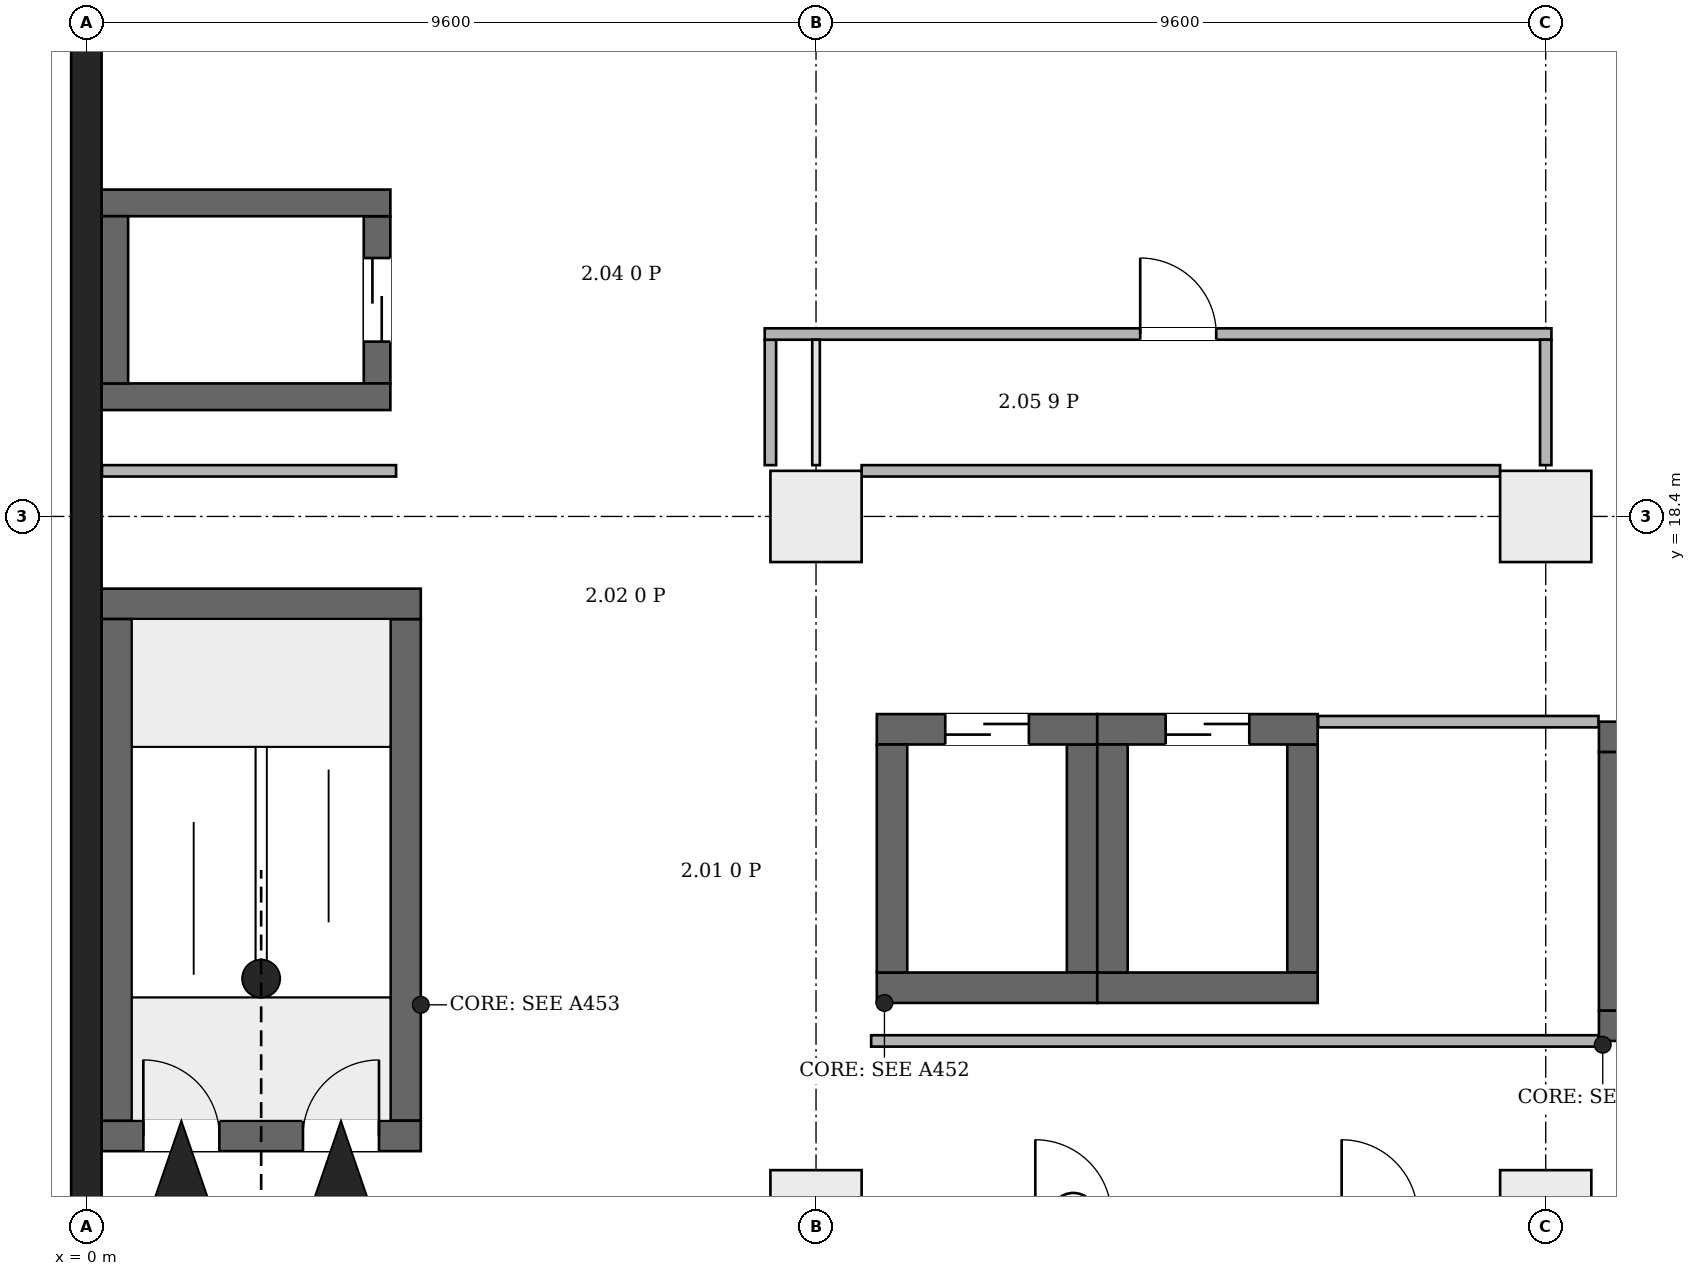
"""IFC4 building model, lengths in metres.
Left out: names, types, materials, properties, quantities, classifications, styles, units other than length and angle.
Written with IfcOpenShell. Run it as: python <this file> out.ifc"""

import sys

from ifc_helpers import new_model, si_unit, direction, frame, frame_2d, origin, origin_2d, place, context, subcontext, project, spatial, rectangle, extrude, element, fill, save


model = new_model("IFC4")
c1 = context("Model", 3, precision=1e-05, world=origin(), true_north=direction((0.0, 1.0)))
c2 = subcontext(c1, "Body", "Model", "MODEL_VIEW")
j1 = project(units=[si_unit("LENGTHUNIT", "METRE"), si_unit("PLANEANGLEUNIT", "RADIAN")], contexts=[c1])
p1 = place(None, origin())
s1 = spatial("IfcSite", under=j1, at=p1, CompositionType="ELEMENT")
p2 = place(p1, origin())
s2 = spatial("IfcBuilding", under=s1, at=p2, CompositionType="ELEMENT")
p3 = place(p2, frame((0.0, 0.0, 14.2)))
s3 = spatial("IfcBuildingStorey", under=s2, at=p3, CompositionType="ELEMENT", Elevation=14.2)
p4 = place(p3, frame((0.0, -0.2, 0.0), z_axis=(0.0, 0.0, 1.0), x_axis=(0.0, 1.0, 0.0)))
e1 = element("IfcWall", 1, at=p4, inside=s3, PredefinedType="SHEAR", context=c2, shape_type="SweptSolid", body=[
    extrude(rectangle(XDim=46.88, YDim=0.4, at=frame_2d((23.44, 0.0))), origin(), (0.0, 0.0, 1.0), 7.5),
])
p5 = place(p3, frame((0.2, 10.25, 0.0), z_axis=(0.0, 0.0, 1.0), x_axis=(1.0, 0.0, 0.0)))
e2 = element("IfcWall", 2, at=p5, inside=s3, PredefinedType="SHEAR", context=c2, shape_type="SweptSolid", body=[
    extrude(rectangle(XDim=4.2, YDim=0.4, at=frame_2d((2.1, 0.0))), origin(), (0.0, 0.0, 1.0), 7.5),
])
p6 = place(p5, frame((0.55, 0.0, 0.0)))
e3 = element("IfcOpeningElement", 3, at=p6, cuts=e2, PredefinedType="OPENING", context=c2, shape_type="SweptSolid", body=[
    extrude(rectangle(XDim=1.0, YDim=2.1, at=frame_2d((0.5, 1.05))), frame((0.0, 0.21, 0.0), z_axis=(0.0, -1.0, 0.0), x_axis=(1.0, 0.0, 0.0)), (0.0, 0.0, 1.0), 0.42),
])
p7 = place(p5, frame((2.65, 0.0, 0.0)))
e4 = element("IfcOpeningElement", 4, at=p7, cuts=e2, PredefinedType="OPENING", context=c2, shape_type="SweptSolid", body=[
    extrude(rectangle(XDim=1.0, YDim=2.1, at=frame_2d((0.5, 1.05))), frame((0.0, 0.21, 0.0), z_axis=(0.0, -1.0, 0.0), x_axis=(1.0, 0.0, 0.0)), (0.0, 0.0, 1.0), 0.42),
])
p8 = place(p3, frame((0.2, 17.25, 0.0), z_axis=(0.0, 0.0, 1.0), x_axis=(1.0, 0.0, 0.0)))
e5 = element("IfcWall", 5, at=p8, inside=s3, PredefinedType="SHEAR", context=c2, shape_type="SweptSolid", body=[
    extrude(rectangle(XDim=4.2, YDim=0.4, at=frame_2d((2.1, 0.0))), origin(), (0.0, 0.0, 1.0), 7.5),
])
for number, where, z_axis, x_axis in (
    (6, (0.4, 10.45, 0.0), (0.0, 0.0, 1.0), (0.0, 1.0, 0.0)),
    (7, (4.2, 10.45, 0.0), (0.0, 0.0, 1.0), (0.0, 1.0, 0.0)),
):
    element("IfcWall", number, at=place(p3, frame(where, z_axis=z_axis, x_axis=x_axis)), inside=s3, PredefinedType="SHEAR", context=c2, shape_type="SweptSolid", body=[
        extrude(rectangle(XDim=6.6, YDim=0.4, at=frame_2d((3.3, 0.0))), origin(), (0.0, 0.0, 1.0), 7.5),
    ])
for number, where, z_axis, x_axis in (
    (8, (0.2, 19.975, 0.0), (0.0, 0.0, 1.0), (1.0, 0.0, 0.0)),
    (9, (0.2, 22.525, 0.0), (0.0, 0.0, 1.0), (1.0, 0.0, 0.0)),
):
    element("IfcWall", number, at=place(p3, frame(where, z_axis=z_axis, x_axis=x_axis)), inside=s3, PredefinedType="SHEAR", context=c2, shape_type="SweptSolid", body=[
        extrude(rectangle(XDim=3.8, YDim=0.35, at=frame_2d((1.9, 0.0))), origin(), (0.0, 0.0, 1.0), 7.5),
    ])
p9 = place(p3, frame((0.375, 20.15, 0.0), z_axis=(0.0, 0.0, 1.0), x_axis=(0.0, 1.0, 0.0)))
e10 = element("IfcWall", 10, at=p9, inside=s3, PredefinedType="SHEAR", context=c2, shape_type="SweptSolid", body=[
    extrude(rectangle(XDim=2.2, YDim=0.35, at=frame_2d((1.1, 0.0))), origin(), (0.0, 0.0, 1.0), 7.5),
])
p10 = place(p3, frame((3.825, 20.15, 0.0), z_axis=(0.0, 0.0, 1.0), x_axis=(0.0, 1.0, 0.0)))
e11 = element("IfcWall", 11, at=p10, inside=s3, PredefinedType="SHEAR", context=c2, shape_type="SweptSolid", body=[
    extrude(rectangle(XDim=2.2, YDim=0.35, at=frame_2d((1.1, 0.0))), origin(), (0.0, 0.0, 1.0), 7.5),
])
p11 = place(p10, frame((0.55, 0.0, 0.0)))
e12 = element("IfcOpeningElement", 12, at=p11, cuts=e11, PredefinedType="OPENING", context=c2, shape_type="SweptSolid", body=[
    extrude(rectangle(XDim=1.1, YDim=2.1, at=frame_2d((0.55, 1.05))), frame((0.0, 0.185, 0.0), z_axis=(0.0, -1.0, 0.0), x_axis=(1.0, 0.0, 0.0)), (0.0, 0.0, 1.0), 0.37),
])
p12 = place(p3, frame((10.4, 12.2, 0.0), z_axis=(0.0, 0.0, 1.0), x_axis=(1.0, 0.0, 0.0)))
e13 = element("IfcWall", 13, at=p12, inside=s3, PredefinedType="SHEAR", context=c2, shape_type="SweptSolid", body=[
    extrude(rectangle(XDim=2.9, YDim=0.4, at=frame_2d((1.45, 0.0))), origin(), (0.0, 0.0, 1.0), 7.5),
])
p13 = place(p3, frame((10.4, 15.6, 0.0), z_axis=(0.0, 0.0, 1.0), x_axis=(1.0, 0.0, 0.0)))
e14 = element("IfcWall", 14, at=p13, inside=s3, PredefinedType="SHEAR", context=c2, shape_type="SweptSolid", body=[
    extrude(rectangle(XDim=2.9, YDim=0.4, at=frame_2d((1.45, 0.0))), origin(), (0.0, 0.0, 1.0), 7.5),
])
p14 = place(p13, frame((0.9, 0.0, 0.0)))
e15 = element("IfcOpeningElement", 15, at=p14, cuts=e14, PredefinedType="OPENING", context=c2, shape_type="SweptSolid", body=[
    extrude(rectangle(XDim=1.1, YDim=2.1, at=frame_2d((0.55, 1.05))), frame((0.0, 0.21, 0.0), z_axis=(0.0, -1.0, 0.0), x_axis=(1.0, 0.0, 0.0)), (0.0, 0.0, 1.0), 0.42),
])
for number, where, z_axis, x_axis in (
    (16, (10.6, 12.4, 0.0), (0.0, 0.0, 1.0), (0.0, 1.0, 0.0)),
    (17, (13.1, 12.4, 0.0), (0.0, 0.0, 1.0), (0.0, 1.0, 0.0)),
):
    element("IfcWall", number, at=place(p3, frame(where, z_axis=z_axis, x_axis=x_axis)), inside=s3, PredefinedType="SHEAR", context=c2, shape_type="SweptSolid", body=[
        extrude(rectangle(XDim=3.0, YDim=0.4, at=frame_2d((1.5, 0.0))), origin(), (0.0, 0.0, 1.0), 7.5),
    ])
p15 = place(p3, frame((13.3, 12.2, 0.0), z_axis=(0.0, 0.0, 1.0), x_axis=(1.0, 0.0, 0.0)))
e18 = element("IfcWall", 18, at=p15, inside=s3, PredefinedType="SHEAR", context=c2, shape_type="SweptSolid", body=[
    extrude(rectangle(XDim=2.9, YDim=0.4, at=frame_2d((1.45, 0.0))), origin(), (0.0, 0.0, 1.0), 7.5),
])
p16 = place(p3, frame((13.3, 15.6, 0.0), z_axis=(0.0, 0.0, 1.0), x_axis=(1.0, 0.0, 0.0)))
e19 = element("IfcWall", 19, at=p16, inside=s3, PredefinedType="SHEAR", context=c2, shape_type="SweptSolid", body=[
    extrude(rectangle(XDim=2.9, YDim=0.4, at=frame_2d((1.45, 0.0))), origin(), (0.0, 0.0, 1.0), 7.5),
])
p17 = place(p16, frame((0.9, 0.0, 0.0)))
e20 = element("IfcOpeningElement", 20, at=p17, cuts=e19, PredefinedType="OPENING", context=c2, shape_type="SweptSolid", body=[
    extrude(rectangle(XDim=1.1, YDim=2.1, at=frame_2d((0.55, 1.05))), frame((0.0, 0.21, 0.0), z_axis=(0.0, -1.0, 0.0), x_axis=(1.0, 0.0, 0.0)), (0.0, 0.0, 1.0), 0.42),
])
for number, where, z_axis, x_axis in (
    (21, (13.5, 12.4, 0.0), (0.0, 0.0, 1.0), (0.0, 1.0, 0.0)),
    (22, (16.0, 12.4, 0.0), (0.0, 0.0, 1.0), (0.0, 1.0, 0.0)),
):
    element("IfcWall", number, at=place(p3, frame(where, z_axis=z_axis, x_axis=x_axis)), inside=s3, PredefinedType="SHEAR", context=c2, shape_type="SweptSolid", body=[
        extrude(rectangle(XDim=3.0, YDim=0.4, at=frame_2d((1.5, 0.0))), origin(), (0.0, 0.0, 1.0), 7.5),
    ])
p18 = place(p3, frame((19.9, 11.7, 0.0), z_axis=(0.0, 0.0, 1.0), x_axis=(1.0, 0.0, 0.0)))
e23 = element("IfcWall", 23, at=p18, inside=s3, PredefinedType="SHEAR", context=c2, shape_type="SweptSolid", body=[
    extrude(rectangle(XDim=3.1, YDim=0.4, at=frame_2d((1.55, 0.0))), origin(), (0.0, 0.0, 1.0), 7.5),
])
p19 = place(p3, frame((19.9, 15.5, 0.0), z_axis=(0.0, 0.0, 1.0), x_axis=(1.0, 0.0, 0.0)))
e24 = element("IfcWall", 24, at=p19, inside=s3, PredefinedType="SHEAR", context=c2, shape_type="SweptSolid", body=[
    extrude(rectangle(XDim=3.1, YDim=0.4, at=frame_2d((1.55, 0.0))), origin(), (0.0, 0.0, 1.0), 7.5),
])
p20 = place(p19, frame((0.95, 0.0, 0.0)))
e25 = element("IfcOpeningElement", 25, at=p20, cuts=e24, PredefinedType="OPENING", context=c2, shape_type="SweptSolid", body=[
    extrude(rectangle(XDim=1.2, YDim=2.1, at=frame_2d((0.6, 1.05))), frame((0.0, 0.21, 0.0), z_axis=(0.0, -1.0, 0.0), x_axis=(1.0, 0.0, 0.0)), (0.0, 0.0, 1.0), 0.42),
])
p21 = place(p3, frame((20.1, 11.9, 0.0), z_axis=(0.0, 0.0, 1.0), x_axis=(0.0, 1.0, 0.0)))
e26 = element("IfcWall", 26, at=p21, inside=s3, PredefinedType="SHEAR", context=c2, shape_type="SweptSolid", body=[
    extrude(rectangle(XDim=3.4, YDim=0.4, at=frame_2d((1.7, 0.0))), origin(), (0.0, 0.0, 1.0), 7.5),
])
for number, where, z_axis, x_axis in (
    (27, (9.6, 9.2, 0.0), (0.0, 0.0, 1.0), (1.0, 0.0, 0.0)),
    (28, (19.2, 9.2, 0.0), (0.0, 0.0, 1.0), (1.0, 0.0, 0.0)),
    (29, (9.6, 18.4, 0.0), (0.0, 0.0, 1.0), (1.0, 0.0, 0.0)),
    (30, (19.2, 18.4, 0.0), (0.0, 0.0, 1.0), (1.0, 0.0, 0.0)),
):
    element("IfcColumn", number, at=place(p3, frame(where, z_axis=z_axis, x_axis=x_axis)), inside=s3, PredefinedType="COLUMN", context=c2, shape_type="SweptSolid", body=[
        extrude(rectangle(XDim=1.2, YDim=1.2, at=origin_2d()), origin(), (0.0, 0.0, 1.0), 7.5),
    ])
p22 = place(p3, frame((0.206, 19.0, 0.0), z_axis=(0.0, 0.0, 1.0), x_axis=(1.0, 0.0, 0.0)))
e31 = element("IfcWall", 31, at=p22, inside=s3, PredefinedType="PARTITIONING", context=c2, shape_type="SweptSolid", body=[
    extrude(rectangle(XDim=3.869, YDim=0.15, at=frame_2d((1.935, 0.0))), origin(), (0.0, 0.0, 1.0), 7.15),
])
p23 = place(p3, frame((9.0, 19.075, 0.0), z_axis=(0.0, 0.0, 1.0), x_axis=(0.0, 1.0, 0.0)))
e32 = element("IfcWall", 32, at=p23, inside=s3, PredefinedType="PARTITIONING", context=c2, shape_type="SweptSolid", body=[
    extrude(rectangle(XDim=1.65, YDim=0.15, at=frame_2d((0.825, 0.0))), origin(), (0.0, 0.0, 1.0), 7.15),
])
p24 = place(p3, frame((8.925, 20.8, 0.0), z_axis=(0.0, 0.0, 1.0), x_axis=(1.0, 0.0, 0.0)))
e33 = element("IfcWall", 33, at=p24, inside=s3, PredefinedType="PARTITIONING", context=c2, shape_type="SweptSolid", body=[
    extrude(rectangle(XDim=10.35, YDim=0.15, at=frame_2d((5.175, 0.0))), origin(), (0.0, 0.0, 1.0), 7.15),
])
p25 = place(p24, frame((4.94, 0.0, 0.0)))
e34 = element("IfcOpeningElement", 34, at=p25, cuts=e33, PredefinedType="OPENING", context=c2, shape_type="SweptSolid", body=[
    extrude(rectangle(XDim=1.0, YDim=2.1, at=frame_2d((0.5, 1.05))), frame((0.0, 0.085, 0.0), z_axis=(0.0, -1.0, 0.0), x_axis=(1.0, 0.0, 0.0)), (0.0, 0.0, 1.0), 0.17),
])
p26 = place(p3, frame((9.6, 19.075, 0.0), z_axis=(0.0, 0.0, 1.0), x_axis=(0.0, 1.0, 0.0)))
e35 = element("IfcWall", 35, at=p26, inside=s3, PredefinedType="PARTITIONING", context=c2, shape_type="SweptSolid", body=[
    extrude(rectangle(XDim=1.65, YDim=0.1, at=frame_2d((0.825, 0.0))), origin(), (0.0, 0.0, 1.0), 6.75),
])
p27 = place(p3, frame((10.2, 19.0, 0.0), z_axis=(0.0, 0.0, 1.0), x_axis=(1.0, 0.0, 0.0)))
e36 = element("IfcWall", 36, at=p27, inside=s3, PredefinedType="PARTITIONING", context=c2, shape_type="SweptSolid", body=[
    extrude(rectangle(XDim=8.4, YDim=0.15, at=frame_2d((4.2, 0.0))), origin(), (0.0, 0.0, 1.0), 7.15),
])
p28 = place(p3, frame((10.325, 11.5, 0.0), z_axis=(0.0, 0.0, 1.0), x_axis=(1.0, 0.0, 0.0)))
e37 = element("IfcWall", 37, at=p28, inside=s3, PredefinedType="PARTITIONING", context=c2, shape_type="SweptSolid", body=[
    extrude(rectangle(XDim=9.569, YDim=0.15, at=frame_2d((4.785, 0.0))), origin(), (0.0, 0.0, 1.0), 7.15),
])
p29 = place(p3, frame((16.206, 15.7, 0.0), z_axis=(0.0, 0.0, 1.0), x_axis=(1.0, 0.0, 0.0)))
e38 = element("IfcWall", 38, at=p29, inside=s3, PredefinedType="PARTITIONING", context=c2, shape_type="SweptSolid", body=[
    extrude(rectangle(XDim=3.688, YDim=0.15, at=frame_2d((1.844, 0.0))), origin(), (0.0, 0.0, 1.0), 7.15),
])
p30 = place(p3, frame((19.2, 19.075, 0.0), z_axis=(0.0, 0.0, 1.0), x_axis=(0.0, 1.0, 0.0)))
e39 = element("IfcWall", 39, at=p30, inside=s3, PredefinedType="PARTITIONING", context=c2, shape_type="SweptSolid", body=[
    extrude(rectangle(XDim=1.65, YDim=0.15, at=frame_2d((0.825, 0.0))), origin(), (0.0, 0.0, 1.0), 6.75),
])
p31 = place(p6, origin())
e40 = element("IfcDoor", 40, at=p31, inside=s3, OperationType="SINGLE_SWING_RIGHT", PredefinedType="DOOR", context=c2, shape_type="SweptSolid", body=[
    extrude(rectangle(XDim=1.0, YDim=2.1, at=frame_2d((0.5, 1.05))), frame((0.0, 0.025, 0.0), z_axis=(0.0, -1.0, 0.0), x_axis=(1.0, 0.0, 0.0)), (0.0, 0.0, 1.0), 0.05),
])
fill(e3, e40)
p32 = place(p7, origin())
e41 = element("IfcDoor", 41, at=p32, inside=s3, OperationType="SINGLE_SWING_LEFT", PredefinedType="DOOR", context=c2, shape_type="SweptSolid", body=[
    extrude(rectangle(XDim=1.0, YDim=2.1, at=frame_2d((0.5, 1.05))), frame((0.0, 0.025, 0.0), z_axis=(0.0, -1.0, 0.0), x_axis=(1.0, 0.0, 0.0)), (0.0, 0.0, 1.0), 0.05),
])
fill(e4, e41)
p33 = place(p11, origin())
e42 = element("IfcDoor", 42, at=p33, inside=s3, OperationType="DOUBLE_DOOR_SLIDING", PredefinedType="DOOR", context=c2, shape_type="SweptSolid", body=[
    extrude(rectangle(XDim=1.1, YDim=2.1, at=frame_2d((0.55, 1.05))), frame((0.0, 0.025, 0.0), z_axis=(0.0, -1.0, 0.0), x_axis=(1.0, 0.0, 0.0)), (0.0, 0.0, 1.0), 0.05),
])
fill(e12, e42)
p34 = place(p14, origin())
e43 = element("IfcDoor", 43, at=p34, inside=s3, OperationType="DOUBLE_DOOR_SLIDING", PredefinedType="DOOR", context=c2, shape_type="SweptSolid", body=[
    extrude(rectangle(XDim=1.1, YDim=2.1, at=frame_2d((0.55, 1.05))), frame((0.0, 0.025, 0.0), z_axis=(0.0, -1.0, 0.0), x_axis=(1.0, 0.0, 0.0)), (0.0, 0.0, 1.0), 0.05),
])
fill(e15, e43)
p35 = place(p17, origin())
e44 = element("IfcDoor", 44, at=p35, inside=s3, OperationType="DOUBLE_DOOR_SLIDING", PredefinedType="DOOR", context=c2, shape_type="SweptSolid", body=[
    extrude(rectangle(XDim=1.1, YDim=2.1, at=frame_2d((0.55, 1.05))), frame((0.0, 0.025, 0.0), z_axis=(0.0, -1.0, 0.0), x_axis=(1.0, 0.0, 0.0)), (0.0, 0.0, 1.0), 0.05),
])
fill(e20, e44)
p36 = place(p25, origin())
e45 = element("IfcDoor", 45, at=p36, inside=s3, OperationType="SINGLE_SWING_LEFT", PredefinedType="DOOR", context=c2, shape_type="SweptSolid", body=[
    extrude(rectangle(XDim=1.0, YDim=2.1, at=frame_2d((0.5, 1.05))), frame((0.0, 0.025, 0.0), z_axis=(0.0, -1.0, 0.0), x_axis=(1.0, 0.0, 0.0)), (0.0, 0.0, 1.0), 0.05),
])
fill(e34, e45)
save(model, sys.argv[1])
